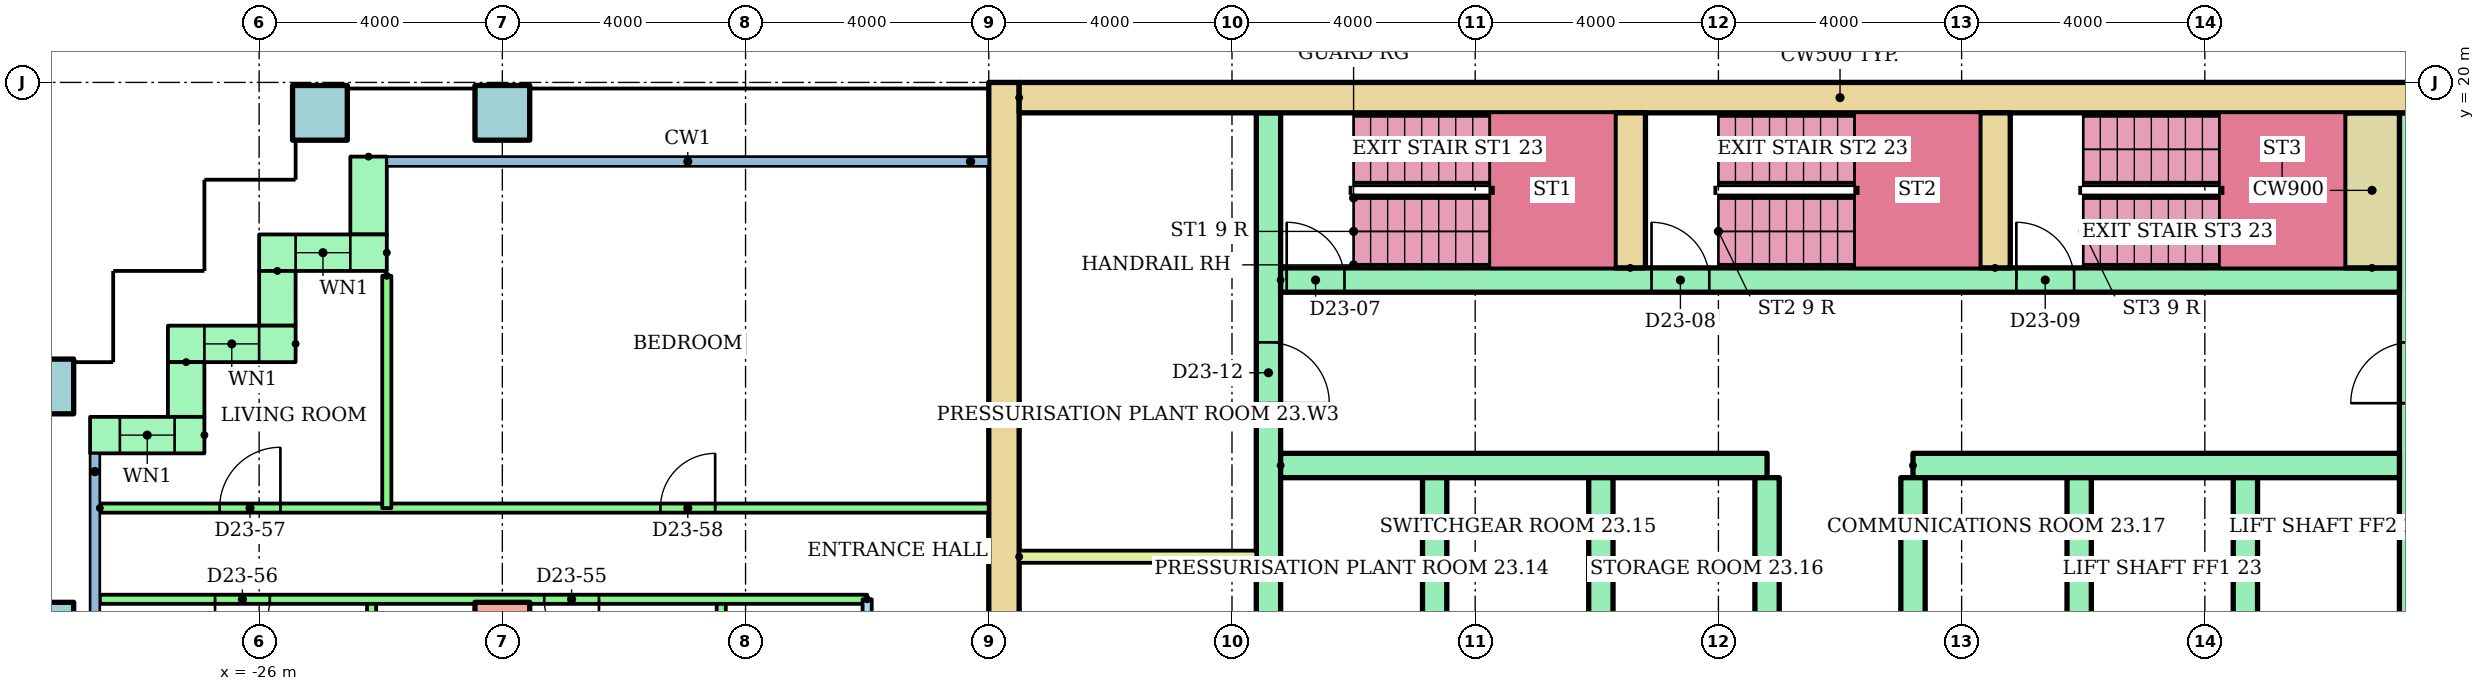
"""IFC4 building model, lengths in metres.
Left out: names, types, materials, properties, quantities, classifications, styles, units other than length and angle.
Written with IfcOpenShell. Run it as: python <this file> out.ifc"""

import sys

from ifc_helpers import new_model, si_unit, direction, frame, frame_2d, origin, origin_2d, place, context, subcontext, project, spatial, rectangle, hollow_rectangle, extrude, element, fill, save


model = new_model("IFC4")
c1 = context("Model", 3, precision=1e-05, world=origin(), true_north=direction((0.0, 1.0)))
c2 = subcontext(c1, "Body", "Model", "MODEL_VIEW")
j1 = project(units=[si_unit("LENGTHUNIT", "METRE"), si_unit("PLANEANGLEUNIT", "RADIAN")], contexts=[c1])
p1 = place(None, origin())
s1 = spatial("IfcSite", under=j1, at=p1, CompositionType="ELEMENT")
p2 = place(p1, origin())
s2 = spatial("IfcBuilding", under=s1, at=p2, CompositionType="ELEMENT")
p3 = place(p2, frame((0.0, 0.0, 90.3)))
s3 = spatial("IfcBuildingStorey", under=s2, at=p3, CompositionType="ELEMENT", Elevation=90.3)
p4 = place(p3, frame((-29.5, 11.0, 0.0)))
e1 = element("IfcColumn", 1, at=p4, inside=s3, PredefinedType="COLUMN", context=c2, shape_type="SweptSolid", body=[
    extrude(hollow_rectangle(XDim=0.9, YDim=0.9, WallThickness=0.045, at=origin_2d()), origin(), (0.0, 0.0, 1.0), 3.2),
])
p5 = place(p3, frame((-22.0, 11.0, 0.0)))
e2 = element("IfcColumn", 2, at=p5, inside=s3, PredefinedType="COLUMN", context=c2, shape_type="SweptSolid", body=[
    extrude(rectangle(XDim=0.9, YDim=0.9, at=origin_2d()), origin(), (0.0, 0.0, 1.0), 3.2),
])
for number, where in (
    (3, (-29.5, 15.0, 0.0)),
    (4, (-25.0, 19.5, 0.0)),
    (5, (-22.0, 19.5, 0.0)),
):
    element("IfcColumn", number, at=place(p3, frame(where)), inside=s3, PredefinedType="COLUMN", context=c2, shape_type="SweptSolid", body=[
        extrude(hollow_rectangle(XDim=0.9, YDim=0.9, WallThickness=0.045, at=origin_2d()), origin(), (0.0, 0.0, 1.0), 3.2),
    ])
p6 = place(p3, frame((-24.2, 18.78, 0.0), z_axis=(0.0, 0.0, 1.0), x_axis=(0.0, -1.0, 0.0)))
e6 = element("IfcWall", 6, at=p6, inside=s3, PredefinedType="STANDARD", context=c2, shape_type="SweptSolid", body=[
    extrude(rectangle(XDim=1.28, YDim=0.6, at=frame_2d((0.64, 0.0))), origin(), (0.0, 0.0, 1.0), 2.92),
])
p7 = place(p3, frame((-23.9, 17.2, 0.0), z_axis=(0.0, 0.0, 1.0), x_axis=(-1.0, 0.0, 0.0)))
e7 = element("IfcWall", 7, at=p7, inside=s3, PredefinedType="STANDARD", context=c2, shape_type="SweptSolid", body=[
    extrude(rectangle(XDim=2.1, YDim=0.6, at=frame_2d((1.05, 0.0))), origin(), (0.0, 0.0, 1.0), 2.92),
])
p8 = place(p7, frame((0.6, 0.0, 0.9)))
e8 = element("IfcOpeningElement", 8, at=p8, cuts=e7, PredefinedType="OPENING", context=c2, shape_type="SweptSolid", body=[
    extrude(rectangle(XDim=0.9, YDim=1.5, at=frame_2d((0.45, 0.75))), frame((0.0, 0.31, 0.0), z_axis=(0.0, -1.0, 0.0), x_axis=(1.0, 0.0, 0.0)), (0.0, 0.0, 1.0), 0.62),
])
p9 = place(p3, frame((-25.7, 16.9, 0.0), z_axis=(0.0, 0.0, 1.0), x_axis=(0.0, -1.0, 0.0)))
e9 = element("IfcWall", 9, at=p9, inside=s3, PredefinedType="STANDARD", context=c2, shape_type="SweptSolid", body=[
    extrude(rectangle(XDim=0.9, YDim=0.6, at=frame_2d((0.45, 0.0))), origin(), (0.0, 0.0, 1.0), 2.92),
])
p10 = place(p3, frame((-25.4, 15.7, 0.0), z_axis=(0.0, 0.0, 1.0), x_axis=(-1.0, 0.0, 0.0)))
e10 = element("IfcWall", 10, at=p10, inside=s3, PredefinedType="STANDARD", context=c2, shape_type="SweptSolid", body=[
    extrude(rectangle(XDim=2.1, YDim=0.6, at=frame_2d((1.05, 0.0))), origin(), (0.0, 0.0, 1.0), 2.92),
])
p11 = place(p10, frame((0.6, 0.0, 0.9)))
e11 = element("IfcOpeningElement", 11, at=p11, cuts=e10, PredefinedType="OPENING", context=c2, shape_type="SweptSolid", body=[
    extrude(rectangle(XDim=0.9, YDim=1.5, at=frame_2d((0.45, 0.75))), frame((0.0, 0.31, 0.0), z_axis=(0.0, -1.0, 0.0), x_axis=(1.0, 0.0, 0.0)), (0.0, 0.0, 1.0), 0.62),
])
p12 = place(p3, frame((-27.2, 15.4, 0.0), z_axis=(0.0, 0.0, 1.0), x_axis=(0.0, -1.0, 0.0)))
e12 = element("IfcWall", 12, at=p12, inside=s3, PredefinedType="STANDARD", context=c2, shape_type="SweptSolid", body=[
    extrude(rectangle(XDim=0.9, YDim=0.6, at=frame_2d((0.45, 0.0))), origin(), (0.0, 0.0, 1.0), 2.92),
])
p13 = place(p3, frame((-26.9, 14.2, 0.0), z_axis=(0.0, 0.0, 1.0), x_axis=(-1.0, 0.0, 0.0)))
e13 = element("IfcWall", 13, at=p13, inside=s3, PredefinedType="STANDARD", context=c2, shape_type="SweptSolid", body=[
    extrude(rectangle(XDim=1.88, YDim=0.6, at=frame_2d((0.94, 0.0))), origin(), (0.0, 0.0, 1.0), 2.92),
])
p14 = place(p13, frame((0.49, 0.0, 0.9)))
e14 = element("IfcOpeningElement", 14, at=p14, cuts=e13, PredefinedType="OPENING", context=c2, shape_type="SweptSolid", body=[
    extrude(rectangle(XDim=0.9, YDim=1.5, at=frame_2d((0.45, 0.75))), frame((0.0, 0.31, 0.0), z_axis=(0.0, -1.0, 0.0), x_axis=(1.0, 0.0, 0.0)), (0.0, 0.0, 1.0), 0.62),
])
p15 = place(p3, frame((-13.75, 3.0, 0.0), z_axis=(0.0, 0.0, 1.0), x_axis=(0.0, 1.0, 0.0)))
e15 = element("IfcWall", 15, at=p15, inside=s3, PredefinedType="SHEAR", context=c2, shape_type="SweptSolid", body=[
    extrude(rectangle(XDim=17.0, YDim=0.5, at=frame_2d((8.5, 0.0))), origin(), (0.0, 0.0, 1.0), 2.92),
])
p16 = place(p3, frame((-13.5, 19.75, 0.0)))
e16 = element("IfcWall", 16, at=p16, inside=s3, PredefinedType="SHEAR", context=c2, shape_type="SweptSolid", body=[
    extrude(rectangle(XDim=27.0, YDim=0.5, at=frame_2d((13.5, 0.0))), origin(), (0.0, 0.0, 1.0), 2.92),
])
p17 = place(p3, frame((-9.4, 6.8, 0.0), z_axis=(0.0, 0.0, 1.0), x_axis=(0.0, 1.0, 0.0)))
e17 = element("IfcWall", 17, at=p17, inside=s3, PredefinedType="SHEAR", context=c2, shape_type="SweptSolid", body=[
    extrude(rectangle(XDim=12.7, YDim=0.4, at=frame_2d((6.35, 0.0))), origin(), (0.0, 0.0, 1.0), 2.92),
])
p18 = place(p17, frame((0.3, 0.0, 0.0)))
e18 = element("IfcOpeningElement", 18, at=p18, cuts=e17, PredefinedType="OPENING", context=c2, shape_type="SweptSolid", body=[
    extrude(rectangle(XDim=1.0, YDim=2.1, at=frame_2d((0.5, 1.05))), frame((0.0, 0.21, 0.0), z_axis=(0.0, -1.0, 0.0), x_axis=(1.0, 0.0, 0.0)), (0.0, 0.0, 1.0), 0.42),
])
p19 = place(p17, frame((2.05, 0.0, 0.0)))
e19 = element("IfcOpeningElement", 19, at=p19, cuts=e17, PredefinedType="OPENING", context=c2, shape_type="SweptSolid", body=[
    extrude(rectangle(XDim=1.0, YDim=2.1, at=frame_2d((0.5, 1.05))), frame((0.0, 0.21, 0.0), z_axis=(0.0, -1.0, 0.0), x_axis=(1.0, 0.0, 0.0)), (0.0, 0.0, 1.0), 0.42),
])
p20 = place(p17, frame((7.925, 0.0, 0.0)))
e20 = element("IfcOpeningElement", 20, at=p20, cuts=e17, PredefinedType="OPENING", context=c2, shape_type="SweptSolid", body=[
    extrude(rectangle(XDim=1.0, YDim=2.1, at=frame_2d((0.5, 1.05))), frame((0.0, 0.21, 0.0), z_axis=(0.0, -1.0, 0.0), x_axis=(1.0, 0.0, 0.0)), (0.0, 0.0, 1.0), 0.42),
])
p21 = place(p3, frame((9.4, 6.8, 0.0), z_axis=(0.0, 0.0, 1.0), x_axis=(0.0, 1.0, 0.0)))
e21 = element("IfcWall", 21, at=p21, inside=s3, PredefinedType="SHEAR", context=c2, shape_type="SweptSolid", body=[
    extrude(rectangle(XDim=12.7, YDim=0.4, at=frame_2d((6.35, 0.0))), origin(), (0.0, 0.0, 1.0), 2.92),
])
p22 = place(p21, frame((1.15, 0.0, 0.0)))
e22 = element("IfcOpeningElement", 22, at=p22, cuts=e21, PredefinedType="OPENING", context=c2, shape_type="SweptSolid", body=[
    extrude(rectangle(XDim=1.0, YDim=2.1, at=frame_2d((0.5, 1.05))), frame((0.0, 0.21, 0.0), z_axis=(0.0, -1.0, 0.0), x_axis=(1.0, 0.0, 0.0)), (0.0, 0.0, 1.0), 0.42),
])
p23 = place(p21, frame((7.925, 0.0, 0.0)))
e23 = element("IfcOpeningElement", 23, at=p23, cuts=e21, PredefinedType="OPENING", context=c2, shape_type="SweptSolid", body=[
    extrude(rectangle(XDim=1.0, YDim=2.1, at=frame_2d((0.5, 1.05))), frame((0.0, 0.21, 0.0), z_axis=(0.0, -1.0, 0.0), x_axis=(1.0, 0.0, 0.0)), (0.0, 0.0, 1.0), 0.42),
])
for number, where in (
    (24, (-9.2, 13.7, 0.0)),
    (25, (1.2, 13.7, 0.0)),
):
    element("IfcWall", number, at=place(p3, frame(where)), inside=s3, PredefinedType="SHEAR", context=c2, shape_type="SweptSolid", body=[
        extrude(rectangle(XDim=8.0, YDim=0.4, at=frame_2d((4.0, 0.0))), origin(), (0.0, 0.0, 1.0), 2.92),
    ])
for number, where, z_axis, x_axis in (
    (26, (-6.667, 10.5, 0.0), (0.0, 0.0, 1.0), (0.0, 1.0, 0.0)),
    (27, (-3.933, 10.5, 0.0), (0.0, 0.0, 1.0), (0.0, 1.0, 0.0)),
    (28, (-1.2, 10.5, 0.0), (0.0, 0.0, 1.0), (0.0, 1.0, 0.0)),
    (29, (1.2, 10.5, 0.0), (0.0, 0.0, 1.0), (0.0, 1.0, 0.0)),
    (30, (3.933, 10.5, 0.0), (0.0, 0.0, 1.0), (0.0, 1.0, 0.0)),
    (31, (6.667, 10.5, 0.0), (0.0, 0.0, 1.0), (0.0, 1.0, 0.0)),
):
    element("IfcWall", number, at=place(p3, frame(where, z_axis=z_axis, x_axis=x_axis)), inside=s3, PredefinedType="SHEAR", context=c2, shape_type="SweptSolid", body=[
        extrude(rectangle(XDim=3.0, YDim=0.4, at=frame_2d((1.5, 0.0))), origin(), (0.0, 0.0, 1.0), 2.92),
    ])
p24 = place(p3, frame((-9.2, 16.75, 0.0)))
e32 = element("IfcWall", 32, at=p24, inside=s3, PredefinedType="SHEAR", context=c2, shape_type="SweptSolid", body=[
    extrude(rectangle(XDim=18.4, YDim=0.4, at=frame_2d((9.2, 0.0))), origin(), (0.0, 0.0, 1.0), 2.92),
])
p25 = place(p24, frame((0.1, 0.0, 0.0)))
e33 = element("IfcOpeningElement", 33, at=p25, cuts=e32, PredefinedType="OPENING", context=c2, shape_type="SweptSolid", body=[
    extrude(rectangle(XDim=0.95, YDim=2.1, at=frame_2d((0.475, 1.05))), frame((0.0, 0.21, 0.0), z_axis=(0.0, -1.0, 0.0), x_axis=(1.0, 0.0, 0.0)), (0.0, 0.0, 1.0), 0.42),
])
p26 = place(p24, frame((6.1, 0.0, 0.0)))
e34 = element("IfcOpeningElement", 34, at=p26, cuts=e32, PredefinedType="OPENING", context=c2, shape_type="SweptSolid", body=[
    extrude(rectangle(XDim=0.95, YDim=2.1, at=frame_2d((0.475, 1.05))), frame((0.0, 0.21, 0.0), z_axis=(0.0, -1.0, 0.0), x_axis=(1.0, 0.0, 0.0)), (0.0, 0.0, 1.0), 0.42),
])
p27 = place(p24, frame((12.1, 0.0, 0.0)))
e35 = element("IfcOpeningElement", 35, at=p27, cuts=e32, PredefinedType="OPENING", context=c2, shape_type="SweptSolid", body=[
    extrude(rectangle(XDim=0.95, YDim=2.1, at=frame_2d((0.475, 1.05))), frame((0.0, 0.21, 0.0), z_axis=(0.0, -1.0, 0.0), x_axis=(1.0, 0.0, 0.0)), (0.0, 0.0, 1.0), 0.42),
])
for number, where, z_axis, x_axis in (
    (36, (-3.45, 16.95, 0.0), (0.0, 0.0, 1.0), (0.0, 1.0, 0.0)),
    (37, (2.55, 16.95, 0.0), (0.0, 0.0, 1.0), (0.0, 1.0, 0.0)),
):
    element("IfcWall", number, at=place(p3, frame(where, z_axis=z_axis, x_axis=x_axis)), inside=s3, PredefinedType="SHEAR", context=c2, shape_type="SweptSolid", body=[
        extrude(rectangle(XDim=2.55, YDim=0.5, at=frame_2d((1.275, 0.0))), origin(), (0.0, 0.0, 1.0), 2.92),
    ])
p28 = place(p3, frame((8.75, 16.95, 0.0), z_axis=(0.0, 0.0, 1.0), x_axis=(0.0, 1.0, 0.0)))
e38 = element("IfcWall", 38, at=p28, inside=s3, PredefinedType="SHEAR", context=c2, shape_type="SweptSolid", body=[
    extrude(rectangle(XDim=2.55, YDim=0.9, at=frame_2d((1.275, 0.0))), origin(), (0.0, 0.0, 1.0), 2.92),
])
p29 = place(p3, frame((-13.5, 12.2, 0.0)))
e39 = element("IfcWall", 39, at=p29, inside=s3, PredefinedType="PARTITIONING", context=c2, shape_type="SweptSolid", body=[
    extrude(rectangle(XDim=3.9, YDim=0.2, at=frame_2d((1.95, 0.0))), origin(), (0.0, 0.0, 1.0), 2.92),
])
p30 = place(p3, frame((-16.0, 1.4, 0.0), z_axis=(0.0, 0.0, 1.0), x_axis=(0.0, 1.0, 0.0)))
e40 = element("IfcWall", 40, at=p30, inside=s3, PredefinedType="PARTITIONING", context=c2, shape_type="SweptSolid", body=[
    extrude(rectangle(XDim=10.1, YDim=0.15, at=frame_2d((5.05, 0.0))), origin(), (0.0, 0.0, 1.0), 2.4),
])
p31 = place(p30, frame((2.3, 0.0, 0.0)))
e41 = element("IfcOpeningElement", 41, at=p31, cuts=e40, PredefinedType="OPENING", context=c2, shape_type="SweptSolid", body=[
    extrude(rectangle(XDim=0.9, YDim=2.1, at=frame_2d((0.45, 1.05))), frame((0.0, 0.085, 0.0), z_axis=(0.0, -1.0, 0.0), x_axis=(1.0, 0.0, 0.0)), (0.0, 0.0, 1.0), 0.17),
])
p32 = place(p30, frame((7.4, 0.0, 0.0)))
e42 = element("IfcOpeningElement", 42, at=p32, cuts=e40, PredefinedType="OPENING", context=c2, shape_type="SweptSolid", body=[
    extrude(rectangle(XDim=0.8, YDim=2.1, at=frame_2d((0.4, 1.05))), frame((0.0, 0.085, 0.0), z_axis=(0.0, -1.0, 0.0), x_axis=(1.0, 0.0, 0.0)), (0.0, 0.0, 1.0), 0.17),
])
for number, where, z_axis, x_axis in (
    (43, (-18.4, 1.4, 0.0), (0.0, 0.0, 1.0), (0.0, 1.0, 0.0)),
    (44, (-24.15, 1.4, 0.0), (0.0, 0.0, 1.0), (0.0, 1.0, 0.0)),
):
    element("IfcWall", number, at=place(p3, frame(where, z_axis=z_axis, x_axis=x_axis)), inside=s3, PredefinedType="PARTITIONING", context=c2, shape_type="SweptSolid", body=[
        extrude(rectangle(XDim=10.1, YDim=0.15, at=frame_2d((5.05, 0.0))), origin(), (0.0, 0.0, 1.0), 2.4),
    ])
p33 = place(p3, frame((-16.0, 11.5, 0.0), z_axis=(0.0, 0.0, 1.0), x_axis=(-1.0, 0.0, 0.0)))
e45 = element("IfcWall", 45, at=p33, inside=s3, PredefinedType="PARTITIONING", context=c2, shape_type="SweptSolid", body=[
    extrude(rectangle(XDim=12.62, YDim=0.15, at=frame_2d((6.31, 0.0))), origin(), (0.0, 0.0, 1.0), 2.4),
])
p34 = place(p33, frame((4.411, 0.0, 0.0)))
e46 = element("IfcOpeningElement", 46, at=p34, cuts=e45, PredefinedType="OPENING", context=c2, shape_type="SweptSolid", body=[
    extrude(rectangle(XDim=0.9, YDim=2.1, at=frame_2d((0.45, 1.05))), frame((0.0, 0.085, 0.0), z_axis=(0.0, -1.0, 0.0), x_axis=(1.0, 0.0, 0.0)), (0.0, 0.0, 1.0), 0.17),
])
p35 = place(p33, frame((9.825, 0.0, 0.0)))
e47 = element("IfcOpeningElement", 47, at=p35, cuts=e45, PredefinedType="OPENING", context=c2, shape_type="SweptSolid", body=[
    extrude(rectangle(XDim=0.9, YDim=2.1, at=frame_2d((0.45, 1.05))), frame((0.0, 0.085, 0.0), z_axis=(0.0, -1.0, 0.0), x_axis=(1.0, 0.0, 0.0)), (0.0, 0.0, 1.0), 0.17),
])
p36 = place(p3, frame((-28.62, 13.0, 0.0)))
e48 = element("IfcWall", 48, at=p36, inside=s3, PredefinedType="PARTITIONING", context=c2, shape_type="SweptSolid", body=[
    extrude(rectangle(XDim=14.62, YDim=0.15, at=frame_2d((7.31, 0.0))), origin(), (0.0, 0.0, 1.0), 2.4),
])
p37 = place(p36, frame((1.97, 0.0, 0.0)))
e49 = element("IfcOpeningElement", 49, at=p37, cuts=e48, PredefinedType="OPENING", context=c2, shape_type="SweptSolid", body=[
    extrude(rectangle(XDim=1.0, YDim=2.1, at=frame_2d((0.5, 1.05))), frame((0.0, 0.085, 0.0), z_axis=(0.0, -1.0, 0.0), x_axis=(1.0, 0.0, 0.0)), (0.0, 0.0, 1.0), 0.17),
])
p38 = place(p36, frame((9.22, 0.0, 0.0)))
e50 = element("IfcOpeningElement", 50, at=p38, cuts=e48, PredefinedType="OPENING", context=c2, shape_type="SweptSolid", body=[
    extrude(rectangle(XDim=0.9, YDim=2.1, at=frame_2d((0.45, 1.05))), frame((0.0, 0.085, 0.0), z_axis=(0.0, -1.0, 0.0), x_axis=(1.0, 0.0, 0.0)), (0.0, 0.0, 1.0), 0.17),
])
p39 = place(p3, frame((-23.9, 16.82, 0.0), z_axis=(0.0, 0.0, 1.0), x_axis=(0.0, -1.0, 0.0)))
e51 = element("IfcWall", 51, at=p39, inside=s3, PredefinedType="PARTITIONING", context=c2, shape_type="SweptSolid", body=[
    extrude(rectangle(XDim=3.82, YDim=0.15, at=frame_2d((1.91, 0.0))), origin(), (0.0, 0.0, 1.0), 2.4),
])
p40 = place(p8, origin())
e52 = element("IfcWindow", 52, at=p40, inside=s3, PartitioningType="SINGLE_PANEL", PredefinedType="WINDOW", context=c2, shape_type="SweptSolid", body=[
    extrude(rectangle(XDim=0.9, YDim=1.5, at=frame_2d((0.45, 0.75))), frame((0.0, 0.03, 0.0), z_axis=(0.0, -1.0, 0.0), x_axis=(1.0, 0.0, 0.0)), (0.0, 0.0, 1.0), 0.06),
])
fill(e8, e52)
p41 = place(p11, origin())
e53 = element("IfcWindow", 53, at=p41, inside=s3, PartitioningType="SINGLE_PANEL", PredefinedType="WINDOW", context=c2, shape_type="SweptSolid", body=[
    extrude(rectangle(XDim=0.9, YDim=1.5, at=frame_2d((0.45, 0.75))), frame((0.0, 0.03, 0.0), z_axis=(0.0, -1.0, 0.0), x_axis=(1.0, 0.0, 0.0)), (0.0, 0.0, 1.0), 0.06),
])
fill(e11, e53)
p42 = place(p14, origin())
e54 = element("IfcWindow", 54, at=p42, inside=s3, PartitioningType="SINGLE_PANEL", PredefinedType="WINDOW", context=c2, shape_type="SweptSolid", body=[
    extrude(rectangle(XDim=0.9, YDim=1.5, at=frame_2d((0.45, 0.75))), frame((0.0, 0.03, 0.0), z_axis=(0.0, -1.0, 0.0), x_axis=(1.0, 0.0, 0.0)), (0.0, 0.0, 1.0), 0.06),
])
fill(e14, e54)
p43 = place(p25, origin())
e55 = element("IfcDoor", 55, at=p43, inside=s3, OperationType="SINGLE_SWING_LEFT", PredefinedType="DOOR", context=c2, shape_type="SweptSolid", body=[
    extrude(rectangle(XDim=0.95, YDim=2.1, at=frame_2d((0.475, 1.05))), frame((0.0, 0.025, 0.0), z_axis=(0.0, -1.0, 0.0), x_axis=(1.0, 0.0, 0.0)), (0.0, 0.0, 1.0), 0.05),
])
fill(e33, e55)
p44 = place(p26, origin())
e56 = element("IfcDoor", 56, at=p44, inside=s3, OperationType="SINGLE_SWING_LEFT", PredefinedType="DOOR", context=c2, shape_type="SweptSolid", body=[
    extrude(rectangle(XDim=0.95, YDim=2.1, at=frame_2d((0.475, 1.05))), frame((0.0, 0.025, 0.0), z_axis=(0.0, -1.0, 0.0), x_axis=(1.0, 0.0, 0.0)), (0.0, 0.0, 1.0), 0.05),
])
fill(e34, e56)
p45 = place(p27, origin())
e57 = element("IfcDoor", 57, at=p45, inside=s3, OperationType="SINGLE_SWING_LEFT", PredefinedType="DOOR", context=c2, shape_type="SweptSolid", body=[
    extrude(rectangle(XDim=0.95, YDim=2.1, at=frame_2d((0.475, 1.05))), frame((0.0, 0.025, 0.0), z_axis=(0.0, -1.0, 0.0), x_axis=(1.0, 0.0, 0.0)), (0.0, 0.0, 1.0), 0.05),
])
fill(e35, e57)
p46 = place(p20, frame((1.0, 0.0, 0.0), z_axis=(0.0, 0.0, 1.0), x_axis=(-1.0, 0.0, 0.0)))
e58 = element("IfcDoor", 58, at=p46, inside=s3, OperationType="SINGLE_SWING_LEFT", PredefinedType="DOOR", context=c2, shape_type="SweptSolid", body=[
    extrude(rectangle(XDim=1.0, YDim=2.1, at=frame_2d((0.5, 1.05))), frame((0.0, 0.025, 0.0), z_axis=(0.0, -1.0, 0.0), x_axis=(1.0, 0.0, 0.0)), (0.0, 0.0, 1.0), 0.05),
])
fill(e20, e58)
p47 = place(p34, origin())
e59 = element("IfcDoor", 59, at=p47, inside=s3, OperationType="SINGLE_SWING_LEFT", PredefinedType="DOOR", context=c2, shape_type="SweptSolid", body=[
    extrude(rectangle(XDim=0.9, YDim=2.1, at=frame_2d((0.45, 1.05))), frame((0.0, 0.025, 0.0), z_axis=(0.0, -1.0, 0.0), x_axis=(1.0, 0.0, 0.0)), (0.0, 0.0, 1.0), 0.05),
])
fill(e46, e59)
p48 = place(p35, origin())
e60 = element("IfcDoor", 60, at=p48, inside=s3, OperationType="SINGLE_SWING_RIGHT", PredefinedType="DOOR", context=c2, shape_type="SweptSolid", body=[
    extrude(rectangle(XDim=0.9, YDim=2.1, at=frame_2d((0.45, 1.05))), frame((0.0, 0.025, 0.0), z_axis=(0.0, -1.0, 0.0), x_axis=(1.0, 0.0, 0.0)), (0.0, 0.0, 1.0), 0.05),
])
fill(e47, e60)
p49 = place(p37, origin())
e61 = element("IfcDoor", 61, at=p49, inside=s3, OperationType="SINGLE_SWING_RIGHT", PredefinedType="DOOR", context=c2, shape_type="SweptSolid", body=[
    extrude(rectangle(XDim=1.0, YDim=2.1, at=frame_2d((0.5, 1.05))), frame((0.0, 0.025, 0.0), z_axis=(0.0, -1.0, 0.0), x_axis=(1.0, 0.0, 0.0)), (0.0, 0.0, 1.0), 0.05),
])
fill(e49, e61)
p50 = place(p38, origin())
e62 = element("IfcDoor", 62, at=p50, inside=s3, OperationType="SINGLE_SWING_RIGHT", PredefinedType="DOOR", context=c2, shape_type="SweptSolid", body=[
    extrude(rectangle(XDim=0.9, YDim=2.1, at=frame_2d((0.45, 1.05))), frame((0.0, 0.025, 0.0), z_axis=(0.0, -1.0, 0.0), x_axis=(1.0, 0.0, 0.0)), (0.0, 0.0, 1.0), 0.05),
])
fill(e50, e62)
save(model, sys.argv[1])
